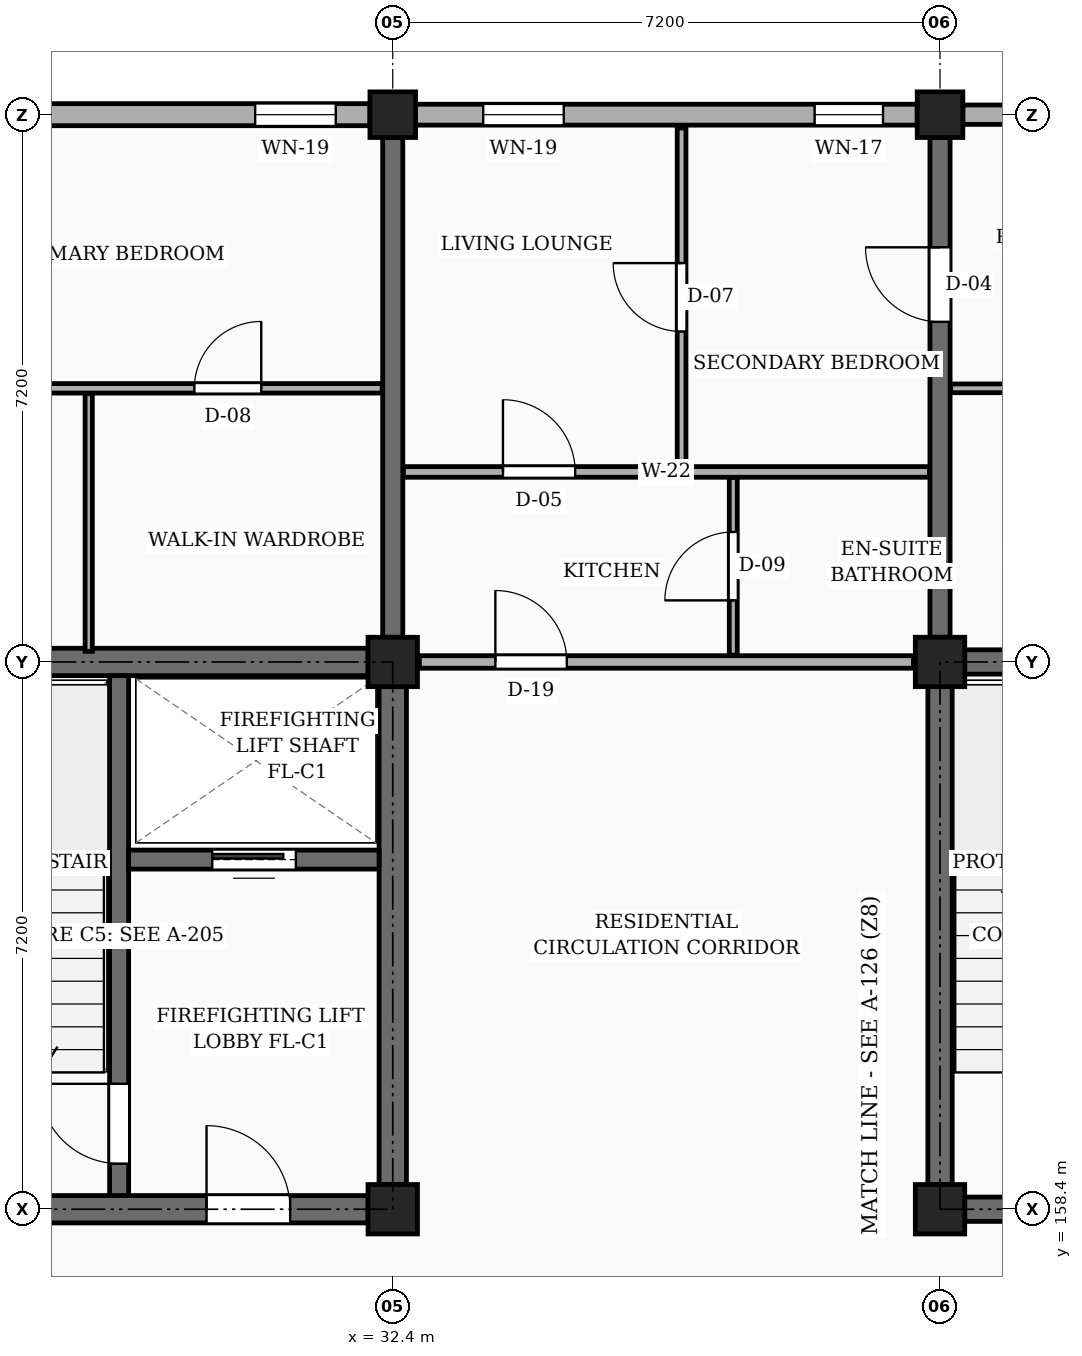
"""IFC4 building model, lengths in metres.
Left out: names, types, materials, properties, quantities, classifications, styles, units other than length and angle.
Written with IfcOpenShell. Run it as: python <this file> out.ifc"""

import sys

from ifc_helpers import new_model, si_unit, direction, frame, frame_2d, origin, origin_2d, place, context, subcontext, project, spatial, rectangle, extrude, element, fill, save


model = new_model("IFC4")
c1 = context("Model", 3, precision=1e-05, world=origin(), true_north=direction((0.0, 1.0)))
c2 = subcontext(c1, "Body", "Model", "MODEL_VIEW")
j1 = project(units=[si_unit("LENGTHUNIT", "METRE"), si_unit("PLANEANGLEUNIT", "RADIAN")], contexts=[c1])
p1 = place(None, origin())
s1 = spatial("IfcSite", under=j1, at=p1, CompositionType="ELEMENT")
p2 = place(p1, origin())
s2 = spatial("IfcBuilding", under=s1, at=p2, CompositionType="ELEMENT")
p3 = place(p2, frame((0.0, 0.0, 4.5)))
s3 = spatial("IfcBuildingStorey", under=s2, at=p3, CompositionType="ELEMENT", Elevation=4.5)
for number, where, z_axis, x_axis in (
    (1, (32.4, 158.4, 0.0), (0.0, 0.0, 1.0), (1.0, 0.0, 0.0)),
    (2, (32.4, 165.6, 0.0), (0.0, 0.0, 1.0), (1.0, 0.0, 0.0)),
):
    element("IfcColumn", number, at=place(p3, frame(where, z_axis=z_axis, x_axis=x_axis)), inside=s3, PredefinedType="COLUMN", context=c2, shape_type="SweptSolid", body=[
        extrude(rectangle(XDim=0.65, YDim=0.65, at=origin_2d()), origin(), (0.0, 0.0, 1.0), 3.15),
    ])
p4 = place(p3, frame((32.4, 172.8, 0.0), z_axis=(0.0, 0.0, 1.0), x_axis=(1.0, 0.0, 0.0)))
e3 = element("IfcColumn", 3, at=p4, inside=s3, PredefinedType="COLUMN", context=c2, shape_type="SweptSolid", body=[
    extrude(rectangle(XDim=0.6, YDim=0.6, at=origin_2d()), origin(), (0.0, 0.0, 1.0), 3.15),
])
for number, where, z_axis, x_axis in (
    (4, (39.6, 158.4, 0.0), (0.0, 0.0, 1.0), (1.0, 0.0, 0.0)),
    (5, (39.6, 165.6, 0.0), (0.0, 0.0, 1.0), (1.0, 0.0, 0.0)),
):
    element("IfcColumn", number, at=place(p3, frame(where, z_axis=z_axis, x_axis=x_axis)), inside=s3, PredefinedType="COLUMN", context=c2, shape_type="SweptSolid", body=[
        extrude(rectangle(XDim=0.65, YDim=0.65, at=origin_2d()), origin(), (0.0, 0.0, 1.0), 3.15),
    ])
p5 = place(p3, frame((39.6, 172.8, 0.0), z_axis=(0.0, 0.0, 1.0), x_axis=(1.0, 0.0, 0.0)))
e6 = element("IfcColumn", 6, at=p5, inside=s3, PredefinedType="COLUMN", context=c2, shape_type="SweptSolid", body=[
    extrude(rectangle(XDim=0.6, YDim=0.6, at=origin_2d()), origin(), (0.0, 0.0, 1.0), 3.15),
])
p6 = place(p3, frame((32.4, 165.925, 0.0), z_axis=(0.0, 0.0, 1.0), x_axis=(0.0, 1.0, 0.0)))
e7 = element("IfcWall", 7, at=p6, inside=s3, PredefinedType="SOLIDWALL", context=c2, shape_type="SweptSolid", body=[
    extrude(rectangle(XDim=6.575, YDim=0.265, at=frame_2d((3.288, 0.0))), origin(), (0.0, 0.0, 1.0), 2.185),
])
p7 = place(p3, frame((39.6, 165.925, 0.0), z_axis=(0.0, 0.0, 1.0), x_axis=(0.0, 1.0, 0.0)))
e8 = element("IfcWall", 8, at=p7, inside=s3, PredefinedType="SOLIDWALL", context=c2, shape_type="SweptSolid", body=[
    extrude(rectangle(XDim=6.575, YDim=0.265, at=frame_2d((3.288, 0.0))), origin(), (0.0, 0.0, 1.0), 2.185),
])
p8 = place(p7, frame((4.15, 0.0, 0.0)))
e9 = element("IfcOpeningElement", 9, at=p8, cuts=e8, PredefinedType="OPENING", context=c2, shape_type="SweptSolid", body=[
    extrude(rectangle(XDim=0.98, YDim=2.12, at=frame_2d((0.49, 1.06))), frame((0.0, 0.143, 0.0), z_axis=(0.0, -1.0, 0.0), x_axis=(1.0, 0.0, 0.0)), (0.0, 0.0, 1.0), 0.285),
])
p9 = place(p3, frame((46.5, 172.8, 0.0), z_axis=(0.0, 0.0, 1.0), x_axis=(-1.0, 0.0, 0.0)))
e10 = element("IfcWall", 10, at=p9, inside=s3, PredefinedType="SOLIDWALL", context=c2, shape_type="SweptSolid", body=[
    extrude(rectangle(XDim=6.6, YDim=0.255, at=frame_2d((3.3, 0.0))), origin(), (0.0, 0.0, 1.0), 2.455),
])
p10 = place(p9, frame((0.45, 0.0, 0.78)))
e11 = element("IfcOpeningElement", 11, at=p10, cuts=e10, PredefinedType="OPENING", context=c2, shape_type="SweptSolid", body=[
    extrude(rectangle(XDim=1.36, YDim=1.26, at=frame_2d((0.68, 0.63))), frame((0.0, 0.137, 0.0), z_axis=(0.0, -1.0, 0.0), x_axis=(1.0, 0.0, 0.0)), (0.0, 0.0, 1.0), 0.275),
])
p11 = place(p9, frame((4.65, 0.0, 0.78)))
e12 = element("IfcOpeningElement", 12, at=p11, cuts=e10, PredefinedType="OPENING", context=c2, shape_type="SweptSolid", body=[
    extrude(rectangle(XDim=0.9, YDim=1.36, at=frame_2d((0.45, 0.68))), frame((0.0, 0.137, 0.0), z_axis=(0.0, -1.0, 0.0), x_axis=(1.0, 0.0, 0.0)), (0.0, 0.0, 1.0), 0.275),
])
p12 = place(p3, frame((39.3, 172.8, 0.0), z_axis=(0.0, 0.0, 1.0), x_axis=(-1.0, 0.0, 0.0)))
e13 = element("IfcWall", 13, at=p12, inside=s3, PredefinedType="SOLIDWALL", context=c2, shape_type="SweptSolid", body=[
    extrude(rectangle(XDim=6.6, YDim=0.275, at=frame_2d((3.3, 0.0))), origin(), (0.0, 0.0, 1.0), 2.455),
])
p13 = place(p12, frame((0.45, 0.0, 0.78)))
e14 = element("IfcOpeningElement", 14, at=p13, cuts=e13, PredefinedType="OPENING", context=c2, shape_type="SweptSolid", body=[
    extrude(rectangle(XDim=0.9, YDim=1.36, at=frame_2d((0.45, 0.68))), frame((0.0, 0.147, 0.0), z_axis=(0.0, -1.0, 0.0), x_axis=(1.0, 0.0, 0.0)), (0.0, 0.0, 1.0), 0.295),
])
p14 = place(p12, frame((4.65, 0.0, 0.78)))
e15 = element("IfcOpeningElement", 15, at=p14, cuts=e13, PredefinedType="OPENING", context=c2, shape_type="SweptSolid", body=[
    extrude(rectangle(XDim=1.06, YDim=1.36, at=frame_2d((0.53, 0.68))), frame((0.0, 0.147, 0.0), z_axis=(0.0, -1.0, 0.0), x_axis=(1.0, 0.0, 0.0)), (0.0, 0.0, 1.0), 0.295),
])
p15 = place(p3, frame((32.1, 172.8, 0.0), z_axis=(0.0, 0.0, 1.0), x_axis=(-1.0, 0.0, 0.0)))
e16 = element("IfcWall", 16, at=p15, inside=s3, PredefinedType="SOLIDWALL", context=c2, shape_type="SweptSolid", body=[
    extrude(rectangle(XDim=6.6, YDim=0.29, at=frame_2d((3.3, 0.0))), origin(), (0.0, 0.0, 1.0), 2.455),
])
p16 = place(p15, frame((0.45, 0.0, 0.78)))
e17 = element("IfcOpeningElement", 17, at=p16, cuts=e16, PredefinedType="OPENING", context=c2, shape_type="SweptSolid", body=[
    extrude(rectangle(XDim=1.06, YDim=1.36, at=frame_2d((0.53, 0.68))), frame((0.0, 0.155, 0.0), z_axis=(0.0, -1.0, 0.0), x_axis=(1.0, 0.0, 0.0)), (0.0, 0.0, 1.0), 0.31),
])
p17 = place(p15, frame((4.65, 0.0, 0.78)))
e18 = element("IfcOpeningElement", 18, at=p17, cuts=e16, PredefinedType="OPENING", context=c2, shape_type="SweptSolid", body=[
    extrude(rectangle(XDim=1.22, YDim=1.36, at=frame_2d((0.61, 0.68))), frame((0.0, 0.155, 0.0), z_axis=(0.0, -1.0, 0.0), x_axis=(1.0, 0.0, 0.0)), (0.0, 0.0, 1.0), 0.31),
])
p18 = place(p3, frame((25.525, 165.6, 0.0), z_axis=(0.0, 0.0, 1.0), x_axis=(1.0, 0.0, 0.0)))
e19 = element("IfcWall", 19, at=p18, inside=s3, PredefinedType="SHEAR", context=c2, shape_type="SweptSolid", body=[
    extrude(rectangle(XDim=6.55, YDim=0.36, at=frame_2d((3.275, 0.0))), origin(), (0.0, 0.0, 1.0), 2.885),
])
p19 = place(p3, frame((32.4, 158.725, 0.0), z_axis=(0.0, 0.0, 1.0), x_axis=(0.0, 1.0, 0.0)))
e20 = element("IfcWall", 20, at=p19, inside=s3, PredefinedType="SHEAR", context=c2, shape_type="SweptSolid", body=[
    extrude(rectangle(XDim=6.55, YDim=0.36, at=frame_2d((3.275, 0.0))), origin(), (0.0, 0.0, 1.0), 2.885),
])
p20 = place(p3, frame((25.525, 158.4, 0.0), z_axis=(0.0, 0.0, 1.0), x_axis=(1.0, 0.0, 0.0)))
e21 = element("IfcWall", 21, at=p20, inside=s3, PredefinedType="SHEAR", context=c2, shape_type="SweptSolid", body=[
    extrude(rectangle(XDim=6.55, YDim=0.36, at=frame_2d((3.275, 0.0))), origin(), (0.0, 0.0, 1.0), 2.885),
])
p21 = place(p20, frame((4.425, 0.0, 0.0)))
e22 = element("IfcOpeningElement", 22, at=p21, cuts=e21, PredefinedType="OPENING", context=c2, shape_type="SweptSolid", body=[
    extrude(rectangle(XDim=1.1, YDim=2.15, at=frame_2d((0.55, 1.075))), frame((0.0, 0.19, 0.0), z_axis=(0.0, -1.0, 0.0), x_axis=(1.0, 0.0, 0.0)), (0.0, 0.0, 1.0), 0.38),
])
p22 = place(p3, frame((28.8, 158.58, 0.0), z_axis=(0.0, 0.0, 1.0), x_axis=(0.0, 1.0, 0.0)))
e23 = element("IfcWall", 23, at=p22, inside=s3, PredefinedType="SHEAR", context=c2, shape_type="SweptSolid", body=[
    extrude(rectangle(XDim=6.84, YDim=0.25, at=frame_2d((3.42, 0.0))), origin(), (0.0, 0.0, 1.0), 2.885),
])
p23 = place(p22, frame((0.42, 0.0, 0.0)))
e24 = element("IfcOpeningElement", 24, at=p23, cuts=e23, PredefinedType="OPENING", context=c2, shape_type="SweptSolid", body=[
    extrude(rectangle(XDim=1.05, YDim=2.15, at=frame_2d((0.525, 1.075))), frame((0.0, 0.135, 0.0), z_axis=(0.0, -1.0, 0.0), x_axis=(1.0, 0.0, 0.0)), (0.0, 0.0, 1.0), 0.27),
])
p24 = place(p3, frame((28.925, 163.0, 0.0), z_axis=(0.0, 0.0, 1.0), x_axis=(1.0, 0.0, 0.0)))
e25 = element("IfcWall", 25, at=p24, inside=s3, PredefinedType="SHEAR", context=c2, shape_type="SweptSolid", body=[
    extrude(rectangle(XDim=3.295, YDim=0.25, at=frame_2d((1.647, 0.0))), origin(), (0.0, 0.0, 1.0), 2.885),
])
p25 = place(p24, frame((1.1, 0.0, 0.0)))
e26 = element("IfcOpeningElement", 26, at=p25, cuts=e25, PredefinedType="OPENING", context=c2, shape_type="SweptSolid", body=[
    extrude(rectangle(XDim=1.1, YDim=2.2, at=frame_2d((0.55, 1.1))), frame((0.0, 0.135, 0.0), z_axis=(0.0, -1.0, 0.0), x_axis=(1.0, 0.0, 0.0)), (0.0, 0.0, 1.0), 0.27),
])
p26 = place(p3, frame((39.6, 158.725, 0.0), z_axis=(0.0, 0.0, 1.0), x_axis=(0.0, 1.0, 0.0)))
e27 = element("IfcWall", 27, at=p26, inside=s3, PredefinedType="SHEAR", context=c2, shape_type="SweptSolid", body=[
    extrude(rectangle(XDim=6.55, YDim=0.32, at=frame_2d((3.275, 0.0))), origin(), (0.0, 0.0, 1.0), 2.885),
])
p27 = place(p3, frame((39.925, 165.6, 0.0), z_axis=(0.0, 0.0, 1.0), x_axis=(1.0, 0.0, 0.0)))
e28 = element("IfcWall", 28, at=p27, inside=s3, PredefinedType="SHEAR", context=c2, shape_type="SweptSolid", body=[
    extrude(rectangle(XDim=6.55, YDim=0.32, at=frame_2d((3.275, 0.0))), origin(), (0.0, 0.0, 1.0), 2.885),
])
p28 = place(p3, frame((39.925, 158.4, 0.0), z_axis=(0.0, 0.0, 1.0), x_axis=(1.0, 0.0, 0.0)))
e29 = element("IfcWall", 29, at=p28, inside=s3, PredefinedType="SHEAR", context=c2, shape_type="SweptSolid", body=[
    extrude(rectangle(XDim=6.55, YDim=0.32, at=frame_2d((3.275, 0.0))), origin(), (0.0, 0.0, 1.0), 2.885),
])
p29 = place(p28, frame((4.425, 0.0, 0.0)))
e30 = element("IfcOpeningElement", 30, at=p29, cuts=e29, PredefinedType="OPENING", context=c2, shape_type="SweptSolid", body=[
    extrude(rectangle(XDim=1.1, YDim=2.15, at=frame_2d((0.55, 1.075))), frame((0.0, 0.17, 0.0), z_axis=(0.0, -1.0, 0.0), x_axis=(1.0, 0.0, 0.0)), (0.0, 0.0, 1.0), 0.34),
])
p30 = place(p3, frame((32.75, 165.6, 0.0), z_axis=(0.0, 0.0, 1.0), x_axis=(1.0, 0.0, 0.0)))
e31 = element("IfcWall", 31, at=p30, inside=s3, PredefinedType="PARTITIONING", context=c2, shape_type="SweptSolid", body=[
    extrude(rectangle(XDim=6.5, YDim=0.165, at=frame_2d((3.25, 0.0))), origin(), (0.0, 0.0, 1.0), 2.185),
])
p31 = place(p30, frame((1.0, 0.0, 0.0)))
e32 = element("IfcOpeningElement", 32, at=p31, cuts=e31, PredefinedType="OPENING", context=c2, shape_type="SweptSolid", body=[
    extrude(rectangle(XDim=0.94, YDim=2.12, at=frame_2d((0.47, 1.06))), frame((0.0, 0.093, 0.0), z_axis=(0.0, -1.0, 0.0), x_axis=(1.0, 0.0, 0.0)), (0.0, 0.0, 1.0), 0.185),
])
p32 = place(p3, frame((25.34, 169.2, 0.0), z_axis=(0.0, 0.0, 1.0), x_axis=(1.0, 0.0, 0.0)))
e33 = element("IfcWall", 33, at=p32, inside=s3, PredefinedType="PARTITIONING", context=c2, shape_type="SweptSolid", body=[
    extrude(rectangle(XDim=6.92, YDim=0.125, at=frame_2d((3.46, 0.0))), origin(), (0.0, 0.0, 1.0), 2.32),
])
p33 = place(p32, frame((1.05, 0.0, 0.0)))
e34 = element("IfcOpeningElement", 34, at=p33, cuts=e33, PredefinedType="OPENING", context=c2, shape_type="SweptSolid", body=[
    extrude(rectangle(XDim=0.87, YDim=2.05, at=frame_2d((0.435, 1.025))), frame((0.0, 0.073, 0.0), z_axis=(0.0, -1.0, 0.0), x_axis=(1.0, 0.0, 0.0)), (0.0, 0.0, 1.0), 0.145),
])
p34 = place(p32, frame((4.45, 0.0, 0.0)))
e35 = element("IfcOpeningElement", 35, at=p34, cuts=e33, PredefinedType="OPENING", context=c2, shape_type="SweptSolid", body=[
    extrude(rectangle(XDim=0.88, YDim=2.08, at=frame_2d((0.44, 1.04))), frame((0.0, 0.073, 0.0), z_axis=(0.0, -1.0, 0.0), x_axis=(1.0, 0.0, 0.0)), (0.0, 0.0, 1.0), 0.145),
])
p35 = place(p3, frame((28.4, 165.74, 0.0), z_axis=(0.0, 0.0, 1.0), x_axis=(0.0, 1.0, 0.0)))
e36 = element("IfcWall", 36, at=p35, inside=s3, PredefinedType="PARTITIONING", context=c2, shape_type="SweptSolid", body=[
    extrude(rectangle(XDim=3.39, YDim=0.095, at=frame_2d((1.695, 0.0))), origin(), (0.0, 0.0, 1.0), 2.32),
])
p36 = place(p3, frame((36.2, 168.17, 0.0), z_axis=(0.0, 0.0, 1.0), x_axis=(0.0, 1.0, 0.0)))
e37 = element("IfcWall", 37, at=p36, inside=s3, PredefinedType="PARTITIONING", context=c2, shape_type="SweptSolid", body=[
    extrude(rectangle(XDim=4.455, YDim=0.115, at=frame_2d((2.228, 0.0))), origin(), (0.0, 0.0, 1.0), 2.32),
])
p37 = place(p36, frame((1.778, 0.0, 0.0)))
e38 = element("IfcOpeningElement", 38, at=p37, cuts=e37, PredefinedType="OPENING", context=c2, shape_type="SweptSolid", body=[
    extrude(rectangle(XDim=0.9, YDim=2.1, at=frame_2d((0.45, 1.05))), frame((0.0, 0.067, 0.0), z_axis=(0.0, -1.0, 0.0), x_axis=(1.0, 0.0, 0.0)), (0.0, 0.0, 1.0), 0.135),
])
p38 = place(p3, frame((36.88, 165.69, 0.0), z_axis=(0.0, 0.0, 1.0), x_axis=(0.0, 1.0, 0.0)))
e39 = element("IfcWall", 39, at=p38, inside=s3, PredefinedType="PARTITIONING", context=c2, shape_type="SweptSolid", body=[
    extrude(rectangle(XDim=2.34, YDim=0.105, at=frame_2d((1.17, 0.0))), origin(), (0.0, 0.0, 1.0), 2.32),
])
p39 = place(p38, frame((0.72, 0.0, 0.0)))
e40 = element("IfcOpeningElement", 40, at=p39, cuts=e39, PredefinedType="OPENING", context=c2, shape_type="SweptSolid", body=[
    extrude(rectangle(XDim=0.9, YDim=2.05, at=frame_2d((0.45, 1.025))), frame((0.0, 0.062, 0.0), z_axis=(0.0, -1.0, 0.0), x_axis=(1.0, 0.0, 0.0)), (0.0, 0.0, 1.0), 0.125),
])
p40 = place(p3, frame((32.54, 168.1, 0.0), z_axis=(0.0, 0.0, 1.0), x_axis=(1.0, 0.0, 0.0)))
e41 = element("IfcWall", 41, at=p40, inside=s3, PredefinedType="PARTITIONING", context=c2, shape_type="SweptSolid", body=[
    extrude(rectangle(XDim=6.92, YDim=0.14, at=frame_2d((3.46, 0.0))), origin(), (0.0, 0.0, 1.0), 2.32),
])
p41 = place(p40, frame((1.31, 0.0, 0.0)))
e42 = element("IfcOpeningElement", 42, at=p41, cuts=e41, PredefinedType="OPENING", context=c2, shape_type="SweptSolid", body=[
    extrude(rectangle(XDim=0.95, YDim=2.1, at=frame_2d((0.475, 1.05))), frame((0.0, 0.08, 0.0), z_axis=(0.0, -1.0, 0.0), x_axis=(1.0, 0.0, 0.0)), (0.0, 0.0, 1.0), 0.16),
])
p42 = place(p3, frame((39.74, 169.2, 0.0), z_axis=(0.0, 0.0, 1.0), x_axis=(1.0, 0.0, 0.0)))
e43 = element("IfcWall", 43, at=p42, inside=s3, PredefinedType="PARTITIONING", context=c2, shape_type="SweptSolid", body=[
    extrude(rectangle(XDim=6.92, YDim=0.115, at=frame_2d((3.46, 0.0))), origin(), (0.0, 0.0, 1.0), 2.32),
])
p43 = place(p42, frame((1.05, 0.0, 0.0)))
e44 = element("IfcOpeningElement", 44, at=p43, cuts=e43, PredefinedType="OPENING", context=c2, shape_type="SweptSolid", body=[
    extrude(rectangle(XDim=0.87, YDim=2.05, at=frame_2d((0.435, 1.025))), frame((0.0, 0.067, 0.0), z_axis=(0.0, -1.0, 0.0), x_axis=(1.0, 0.0, 0.0)), (0.0, 0.0, 1.0), 0.135),
])
p44 = place(p42, frame((4.45, 0.0, 0.0)))
e45 = element("IfcOpeningElement", 45, at=p44, cuts=e43, PredefinedType="OPENING", context=c2, shape_type="SweptSolid", body=[
    extrude(rectangle(XDim=0.88, YDim=2.08, at=frame_2d((0.44, 1.04))), frame((0.0, 0.067, 0.0), z_axis=(0.0, -1.0, 0.0), x_axis=(1.0, 0.0, 0.0)), (0.0, 0.0, 1.0), 0.135),
])
p45 = place(p13, origin())
e46 = element("IfcWindow", 46, at=p45, inside=s3, PartitioningType="SINGLE_PANEL", PredefinedType="WINDOW", context=c2, shape_type="SweptSolid", body=[
    extrude(rectangle(XDim=0.9, YDim=1.36, at=frame_2d((0.45, 0.68))), frame((0.0, 0.03, 0.0), z_axis=(0.0, -1.0, 0.0), x_axis=(1.0, 0.0, 0.0)), (0.0, 0.0, 1.0), 0.06),
])
fill(e14, e46)
p46 = place(p14, origin())
e47 = element("IfcWindow", 47, at=p46, inside=s3, PartitioningType="SINGLE_PANEL", PredefinedType="WINDOW", context=c2, shape_type="SweptSolid", body=[
    extrude(rectangle(XDim=1.06, YDim=1.36, at=frame_2d((0.53, 0.68))), frame((0.0, 0.03, 0.0), z_axis=(0.0, -1.0, 0.0), x_axis=(1.0, 0.0, 0.0)), (0.0, 0.0, 1.0), 0.06),
])
fill(e15, e47)
p47 = place(p16, origin())
e48 = element("IfcWindow", 48, at=p47, inside=s3, PartitioningType="SINGLE_PANEL", PredefinedType="WINDOW", context=c2, shape_type="SweptSolid", body=[
    extrude(rectangle(XDim=1.06, YDim=1.36, at=frame_2d((0.53, 0.68))), frame((0.0, 0.03, 0.0), z_axis=(0.0, -1.0, 0.0), x_axis=(1.0, 0.0, 0.0)), (0.0, 0.0, 1.0), 0.06),
])
fill(e17, e48)
p48 = place(p21, frame((1.1, 0.0, 0.0), z_axis=(0.0, 0.0, 1.0), x_axis=(-1.0, 0.0, 0.0)))
e49 = element("IfcDoor", 49, at=p48, inside=s3, OperationType="SINGLE_SWING_LEFT", PredefinedType="DOOR", context=c2, shape_type="SweptSolid", body=[
    extrude(rectangle(XDim=1.1, YDim=2.15, at=frame_2d((0.55, 1.075))), frame((0.0, 0.025, 0.0), z_axis=(0.0, -1.0, 0.0), x_axis=(1.0, 0.0, 0.0)), (0.0, 0.0, 1.0), 0.05),
])
fill(e22, e49)
p49 = place(p23, origin())
e50 = element("IfcDoor", 50, at=p49, inside=s3, OperationType="SINGLE_SWING_RIGHT", PredefinedType="DOOR", context=c2, shape_type="SweptSolid", body=[
    extrude(rectangle(XDim=1.05, YDim=2.15, at=frame_2d((0.525, 1.075))), frame((0.0, 0.025, 0.0), z_axis=(0.0, -1.0, 0.0), x_axis=(1.0, 0.0, 0.0)), (0.0, 0.0, 1.0), 0.05),
])
fill(e24, e50)
p50 = place(p25, origin())
e51 = element("IfcDoor", 51, at=p50, inside=s3, OperationType="SLIDING_TO_LEFT", PredefinedType="DOOR", context=c2, shape_type="SweptSolid", body=[
    extrude(rectangle(XDim=1.1, YDim=2.2, at=frame_2d((0.55, 1.1))), frame((0.0, 0.025, 0.0), z_axis=(0.0, -1.0, 0.0), x_axis=(1.0, 0.0, 0.0)), (0.0, 0.0, 1.0), 0.05),
])
fill(e26, e51)
p51 = place(p31, origin())
e52 = element("IfcDoor", 52, at=p51, inside=s3, OperationType="SINGLE_SWING_LEFT", PredefinedType="DOOR", context=c2, shape_type="SweptSolid", body=[
    extrude(rectangle(XDim=0.94, YDim=2.12, at=frame_2d((0.47, 1.06))), frame((0.0, 0.025, 0.0), z_axis=(0.0, -1.0, 0.0), x_axis=(1.0, 0.0, 0.0)), (0.0, 0.0, 1.0), 0.05),
])
fill(e32, e52)
p52 = place(p34, origin())
e53 = element("IfcDoor", 53, at=p52, inside=s3, OperationType="SINGLE_SWING_RIGHT", PredefinedType="DOOR", context=c2, shape_type="SweptSolid", body=[
    extrude(rectangle(XDim=0.88, YDim=2.08, at=frame_2d((0.44, 1.04))), frame((0.0, 0.025, 0.0), z_axis=(0.0, -1.0, 0.0), x_axis=(1.0, 0.0, 0.0)), (0.0, 0.0, 1.0), 0.05),
])
fill(e35, e53)
p53 = place(p37, origin())
e54 = element("IfcDoor", 54, at=p53, inside=s3, OperationType="SINGLE_SWING_RIGHT", PredefinedType="DOOR", context=c2, shape_type="SweptSolid", body=[
    extrude(rectangle(XDim=0.9, YDim=2.1, at=frame_2d((0.45, 1.05))), frame((0.0, 0.025, 0.0), z_axis=(0.0, -1.0, 0.0), x_axis=(1.0, 0.0, 0.0)), (0.0, 0.0, 1.0), 0.05),
])
fill(e38, e54)
p54 = place(p39, origin())
e55 = element("IfcDoor", 55, at=p54, inside=s3, OperationType="SINGLE_SWING_LEFT", PredefinedType="DOOR", context=c2, shape_type="SweptSolid", body=[
    extrude(rectangle(XDim=0.9, YDim=2.05, at=frame_2d((0.45, 1.025))), frame((0.0, 0.025, 0.0), z_axis=(0.0, -1.0, 0.0), x_axis=(1.0, 0.0, 0.0)), (0.0, 0.0, 1.0), 0.05),
])
fill(e40, e55)
p55 = place(p41, origin())
e56 = element("IfcDoor", 56, at=p55, inside=s3, OperationType="SINGLE_SWING_LEFT", PredefinedType="DOOR", context=c2, shape_type="SweptSolid", body=[
    extrude(rectangle(XDim=0.95, YDim=2.1, at=frame_2d((0.475, 1.05))), frame((0.0, 0.025, 0.0), z_axis=(0.0, -1.0, 0.0), x_axis=(1.0, 0.0, 0.0)), (0.0, 0.0, 1.0), 0.05),
])
fill(e42, e56)
p56 = place(p8, origin())
e57 = element("IfcDoor", 57, at=p56, inside=s3, OperationType="SINGLE_SWING_RIGHT", PredefinedType="DOOR", context=c2, shape_type="SweptSolid", body=[
    extrude(rectangle(XDim=0.98, YDim=2.12, at=frame_2d((0.49, 1.06))), frame((0.0, 0.025, 0.0), z_axis=(0.0, -1.0, 0.0), x_axis=(1.0, 0.0, 0.0)), (0.0, 0.0, 1.0), 0.05),
])
fill(e9, e57)
save(model, sys.argv[1])
